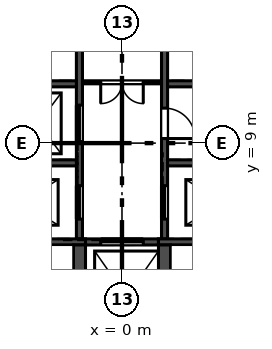
"""IFC4 building model, lengths in metres.
Left out: names, types, materials, properties, quantities, classifications, styles, units other than length and angle.
Written with IfcOpenShell. Run it as: python <this file> out.ifc"""

import sys

from ifc_helpers import new_model, si_unit, direction, frame, frame_2d, origin, place, context, subcontext, project, spatial, rectangle, extrude, element, fill, save


model = new_model("IFC4")
c1 = context("Model", 3, precision=1e-05, world=origin(), true_north=direction((0.0, 1.0)))
c2 = subcontext(c1, "Body", "Model", "MODEL_VIEW")
j1 = project(units=[si_unit("LENGTHUNIT", "METRE"), si_unit("PLANEANGLEUNIT", "RADIAN")], contexts=[c1])
p1 = place(None, origin())
s1 = spatial("IfcSite", under=j1, at=p1, CompositionType="ELEMENT")
p2 = place(p1, origin())
s2 = spatial("IfcBuilding", under=s1, at=p2, CompositionType="ELEMENT")
p3 = place(p2, frame((0.0, 0.0, 132.1)))
s3 = spatial("IfcBuildingStorey", under=s2, at=p3, CompositionType="ELEMENT", Elevation=132.1)
p4 = place(p3, frame((-1.4, 5.85, -0.4), z_axis=(0.0, 0.0, 1.0), x_axis=(0.0, 1.0, 0.0)))
e1 = element("IfcWall", 1, at=p4, inside=s3, PredefinedType="SOLIDWALL", context=c2, shape_type="SweptSolid", body=[
    extrude(rectangle(XDim=11.75, YDim=0.2, at=frame_2d((5.875, 0.0))), origin(), (0.0, 0.0, 1.0), 5.4),
])
p5 = place(p4, frame((3.2, 0.0, 0.4)))
e2 = element("IfcOpeningElement", 2, at=p5, cuts=e1, PredefinedType="OPENING", context=c2, shape_type="SweptSolid", body=[
    extrude(rectangle(XDim=1.2, YDim=2.1, at=frame_2d((0.6, 1.05))), frame((0.0, 0.11, 0.0), z_axis=(0.0, -1.0, 0.0), x_axis=(1.0, 0.0, 0.0)), (0.0, 0.0, 1.0), 0.22),
])
p6 = place(p4, frame((0.65, 0.0, 0.4)))
e3 = element("IfcOpeningElement", 3, at=p6, cuts=e1, PredefinedType="OPENING", context=c2, shape_type="SweptSolid", body=[
    extrude(rectangle(XDim=1.1, YDim=2.1, at=frame_2d((0.55, 1.05))), frame((0.0, 0.11, 0.0), z_axis=(0.0, -1.0, 0.0), x_axis=(1.0, 0.0, 0.0)), (0.0, 0.0, 1.0), 0.22),
])
p7 = place(p3, frame((1.4, 5.85, -0.4), z_axis=(0.0, 0.0, 1.0), x_axis=(0.0, 1.0, 0.0)))
e4 = element("IfcWall", 4, at=p7, inside=s3, PredefinedType="SOLIDWALL", context=c2, shape_type="SweptSolid", body=[
    extrude(rectangle(XDim=11.75, YDim=0.2, at=frame_2d((5.875, 0.0))), origin(), (0.0, 0.0, 1.0), 5.4),
])
p8 = place(p7, frame((0.65, 0.0, 0.4)))
e5 = element("IfcOpeningElement", 5, at=p8, cuts=e4, PredefinedType="OPENING", context=c2, shape_type="SweptSolid", body=[
    extrude(rectangle(XDim=1.1, YDim=2.1, at=frame_2d((0.55, 1.05))), frame((0.0, 0.11, 0.0), z_axis=(0.0, -1.0, 0.0), x_axis=(1.0, 0.0, 0.0)), (0.0, 0.0, 1.0), 0.22),
])
p9 = place(p7, frame((3.3, 0.0, 0.4)))
e6 = element("IfcOpeningElement", 6, at=p9, cuts=e4, PredefinedType="OPENING", context=c2, shape_type="SweptSolid", body=[
    extrude(rectangle(XDim=1.0, YDim=2.1, at=frame_2d((0.5, 1.05))), frame((0.0, 0.11, 0.0), z_axis=(0.0, -1.0, 0.0), x_axis=(1.0, 0.0, 0.0)), (0.0, 0.0, 1.0), 0.22),
])
for number, where, z_axis, x_axis in (
    (7, (-5.7, 8.35, -0.4), (0.0, 0.0, 1.0), (1.0, 0.0, 0.0)),
    (8, (1.5, 8.35, -0.4), (0.0, 0.0, 1.0), (1.0, 0.0, 0.0)),
):
    element("IfcWall", number, at=place(p3, frame(where, z_axis=z_axis, x_axis=x_axis)), inside=s3, PredefinedType="SOLIDWALL", context=c2, shape_type="SweptSolid", body=[
        extrude(rectangle(XDim=4.2, YDim=0.2, at=frame_2d((2.1, 0.0))), origin(), (0.0, 0.0, 1.0), 5.4),
    ])
p10 = place(p3, frame((-12.6, 5.75, -0.4), z_axis=(0.0, 0.0, 1.0), x_axis=(1.0, 0.0, 0.0)))
e9 = element("IfcWall", 9, at=p10, inside=s3, PredefinedType="SOLIDWALL", context=c2, shape_type="SweptSolid", body=[
    extrude(rectangle(XDim=11.4, YDim=0.2, at=frame_2d((5.7, 0.0))), origin(), (0.0, 0.0, 1.0), 5.4),
])
p11 = place(p3, frame((-1.2, 5.75, -0.4), z_axis=(0.0, 0.0, 1.0), x_axis=(1.0, 0.0, 0.0)))
e10 = element("IfcWall", 10, at=p11, inside=s3, PredefinedType="SOLIDWALL", context=c2, shape_type="SweptSolid", body=[
    extrude(rectangle(XDim=2.4, YDim=0.2, at=frame_2d((1.2, 0.0))), origin(), (0.0, 0.0, 1.0), 5.4),
])
p12 = place(p11, frame((0.5, 0.0, 0.4)))
e11 = element("IfcOpeningElement", 11, at=p12, cuts=e10, PredefinedType="OPENING", context=c2, shape_type="SweptSolid", body=[
    extrude(rectangle(XDim=1.4, YDim=2.1, at=frame_2d((0.7, 1.05))), frame((0.0, 0.11, 0.0), z_axis=(0.0, -1.0, 0.0), x_axis=(1.0, 0.0, 0.0)), (0.0, 0.0, 1.0), 0.22),
])
p13 = place(p3, frame((1.2, 5.75, -0.4), z_axis=(0.0, 0.0, 1.0), x_axis=(1.0, 0.0, 0.0)))
e12 = element("IfcWall", 12, at=p13, inside=s3, PredefinedType="SOLIDWALL", context=c2, shape_type="SweptSolid", body=[
    extrude(rectangle(XDim=11.4, YDim=0.2, at=frame_2d((5.7, 0.0))), origin(), (0.0, 0.0, 1.0), 5.4),
])
for number, where, z_axis, x_axis in (
    (13, (-1.4, 2.25, -0.4), (0.0, 0.0, 1.0), (0.0, 1.0, 0.0)),
    (14, (1.4, 2.25, -0.4), (0.0, 0.0, 1.0), (0.0, 1.0, 0.0)),
):
    element("IfcWall", number, at=place(p3, frame(where, z_axis=z_axis, x_axis=x_axis)), inside=s3, PredefinedType="SOLIDWALL", context=c2, shape_type="SweptSolid", body=[
        extrude(rectangle(XDim=3.4, YDim=0.4, at=frame_2d((1.7, 0.0))), origin(), (0.0, 0.0, 1.0), 5.4),
    ])
for number, where, z_axis, x_axis in (
    (15, (-3.5, 10.95, -0.4), (0.0, 0.0, 1.0), (1.0, 0.0, 0.0)),
    (16, (1.5, 10.95, -0.4), (0.0, 0.0, 1.0), (1.0, 0.0, 0.0)),
):
    element("IfcWall", number, at=place(p3, frame(where, z_axis=z_axis, x_axis=x_axis)), inside=s3, PredefinedType="SOLIDWALL", context=c2, shape_type="SweptSolid", body=[
        extrude(rectangle(XDim=2.0, YDim=0.2, at=frame_2d((1.0, 0.0))), origin(), (0.0, 0.0, 1.0), 5.4),
    ])
p14 = place(p3, frame((-1.3, 11.0, 0.0), z_axis=(0.0, 0.0, 1.0), x_axis=(1.0, 0.0, 0.0)))
e17 = element("IfcWall", 17, at=p14, inside=s3, PredefinedType="PARTITIONING", context=c2, shape_type="SweptSolid", body=[
    extrude(rectangle(XDim=2.6, YDim=0.1, at=frame_2d((1.3, 0.0))), origin(), (0.0, 0.0, 1.0), 5.0),
])
p15 = place(p14, frame((0.6, 0.0, 0.0)))
e18 = element("IfcOpeningElement", 18, at=p15, cuts=e17, PredefinedType="OPENING", context=c2, shape_type="SweptSolid", body=[
    extrude(rectangle(XDim=1.4, YDim=2.1, at=frame_2d((0.7, 1.05))), frame((0.0, 0.06, 0.0), z_axis=(0.0, -1.0, 0.0), x_axis=(1.0, 0.0, 0.0)), (0.0, 0.0, 1.0), 0.12),
])
p16 = place(p5, origin())
e19 = element("IfcDoor", 19, at=p16, inside=s3, OperationType="SLIDING_TO_LEFT", PredefinedType="DOOR", context=c2, shape_type="SweptSolid", body=[
    extrude(rectangle(XDim=1.2, YDim=2.1, at=frame_2d((0.6, 1.05))), frame((0.0, 0.025, 0.0), z_axis=(0.0, -1.0, 0.0), x_axis=(1.0, 0.0, 0.0)), (0.0, 0.0, 1.0), 0.05),
])
fill(e2, e19)
p17 = place(p6, origin())
e20 = element("IfcDoor", 20, at=p17, inside=s3, OperationType="SLIDING_TO_RIGHT", PredefinedType="DOOR", context=c2, shape_type="SweptSolid", body=[
    extrude(rectangle(XDim=1.1, YDim=2.1, at=frame_2d((0.55, 1.05))), frame((0.0, 0.025, 0.0), z_axis=(0.0, -1.0, 0.0), x_axis=(1.0, 0.0, 0.0)), (0.0, 0.0, 1.0), 0.05),
])
fill(e3, e20)
p18 = place(p8, origin())
e21 = element("IfcDoor", 21, at=p18, inside=s3, OperationType="SLIDING_TO_RIGHT", PredefinedType="DOOR", context=c2, shape_type="SweptSolid", body=[
    extrude(rectangle(XDim=1.1, YDim=2.1, at=frame_2d((0.55, 1.05))), frame((0.0, 0.025, 0.0), z_axis=(0.0, -1.0, 0.0), x_axis=(1.0, 0.0, 0.0)), (0.0, 0.0, 1.0), 0.05),
])
fill(e5, e21)
p19 = place(p12, origin())
e22 = element("IfcDoor", 22, at=p19, inside=s3, OperationType="SLIDING_TO_LEFT", PredefinedType="DOOR", context=c2, shape_type="SweptSolid", body=[
    extrude(rectangle(XDim=1.4, YDim=2.1, at=frame_2d((0.7, 1.05))), frame((0.0, 0.025, 0.0), z_axis=(0.0, -1.0, 0.0), x_axis=(1.0, 0.0, 0.0)), (0.0, 0.0, 1.0), 0.05),
])
fill(e11, e22)
p20 = place(p9, frame((1.0, 0.0, 0.0), z_axis=(0.0, 0.0, 1.0), x_axis=(-1.0, 0.0, 0.0)))
e23 = element("IfcDoor", 23, at=p20, inside=s3, OperationType="SINGLE_SWING_RIGHT", PredefinedType="DOOR", context=c2, shape_type="SweptSolid", body=[
    extrude(rectangle(XDim=1.0, YDim=2.1, at=frame_2d((0.5, 1.05))), frame((0.0, 0.025, 0.0), z_axis=(0.0, -1.0, 0.0), x_axis=(1.0, 0.0, 0.0)), (0.0, 0.0, 1.0), 0.05),
])
fill(e6, e23)
p21 = place(p15, frame((1.4, 0.0, 0.0), z_axis=(0.0, 0.0, 1.0), x_axis=(-1.0, 0.0, 0.0)))
e24 = element("IfcDoor", 24, at=p21, inside=s3, OperationType="DOUBLE_DOOR_SINGLE_SWING", PredefinedType="DOOR", context=c2, shape_type="SweptSolid", body=[
    extrude(rectangle(XDim=1.4, YDim=2.1, at=frame_2d((0.7, 1.05))), frame((0.0, 0.025, 0.0), z_axis=(0.0, -1.0, 0.0), x_axis=(1.0, 0.0, 0.0)), (0.0, 0.0, 1.0), 0.05),
])
fill(e18, e24)
save(model, sys.argv[1])
